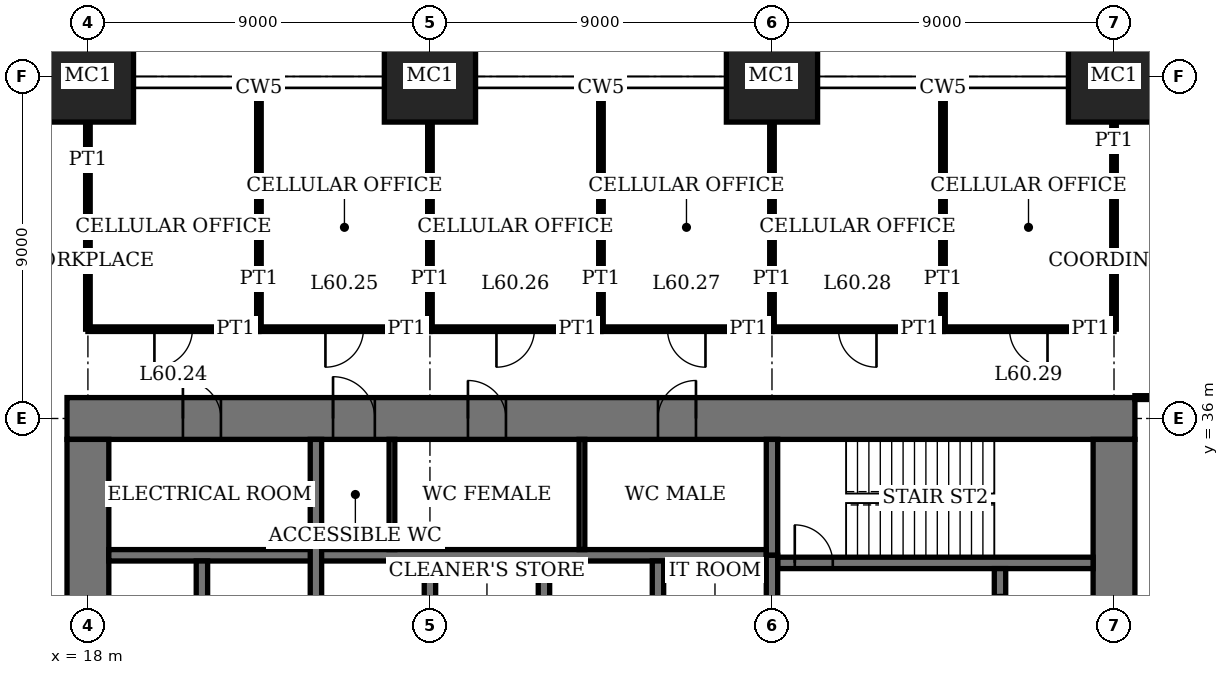
"""IFC4 building model, lengths in metres.
Left out: names, types, materials, properties, quantities, classifications, styles, units other than length and angle.
Written with IfcOpenShell. Run it as: python <this file> out.ifc"""

import sys

from ifc_helpers import new_model, si_unit, direction, frame, frame_2d, origin, origin_2d, place, context, subcontext, project, spatial, rectangle, extrude, element, fill, save


model = new_model("IFC4")
c1 = context("Model", 3, precision=1e-05, world=origin(), true_north=direction((0.0, 1.0)))
c2 = subcontext(c1, "Body", "Model", "MODEL_VIEW")
j1 = project(units=[si_unit("LENGTHUNIT", "METRE"), si_unit("PLANEANGLEUNIT", "RADIAN")], contexts=[c1])
p1 = place(None, origin())
s1 = spatial("IfcSite", under=j1, at=p1, CompositionType="ELEMENT")
p2 = place(p1, origin())
s2 = spatial("IfcBuilding", under=s1, at=p2, CompositionType="ELEMENT")
p3 = place(p2, frame((0.0, 0.0, 247.4)))
s3 = spatial("IfcBuildingStorey", under=s2, at=p3, CompositionType="ELEMENT", Elevation=247.4)
for number, where, z_axis, x_axis in (
    (1, (18.0, 45.0, 0.0), (0.0, 0.0, 1.0), (1.0, 0.0, 0.0)),
    (2, (27.0, 45.0, 0.0), (0.0, 0.0, 1.0), (1.0, 0.0, 0.0)),
    (3, (36.0, 45.0, 0.0), (0.0, 0.0, 1.0), (1.0, 0.0, 0.0)),
    (4, (45.0, 45.0, 0.0), (0.0, 0.0, 1.0), (1.0, 0.0, 0.0)),
):
    element("IfcColumn", number, at=place(p3, frame(where, z_axis=z_axis, x_axis=x_axis)), inside=s3, PredefinedType="COLUMN", context=c2, shape_type="SweptSolid", body=[
        extrude(rectangle(XDim=2.4, YDim=2.4, at=origin_2d()), origin(), (0.0, 0.0, 1.0), 4.0),
    ])
p4 = place(p3, frame((45.55, 36.0, 0.0), z_axis=(0.0, 0.0, 1.0), x_axis=(-1.0, 0.0, 0.0)))
e5 = element("IfcWall", 5, at=p4, inside=s3, PredefinedType="SHEAR", context=c2, shape_type="SweptSolid", body=[
    extrude(rectangle(XDim=28.1, YDim=1.1, at=frame_2d((14.05, 0.0))), origin(), (0.0, 0.0, 1.0), 4.0),
])
p5 = place(p4, frame((11.55, 0.0, 0.0)))
e6 = element("IfcOpeningElement", 6, at=p5, cuts=e5, PredefinedType="OPENING", context=c2, shape_type="SweptSolid", body=[
    extrude(rectangle(XDim=1.0, YDim=2.4, at=frame_2d((0.5, 1.2))), frame((0.0, 0.56, 0.0), z_axis=(0.0, -1.0, 0.0), x_axis=(1.0, 0.0, 0.0)), (0.0, 0.0, 1.0), 1.12),
])
p6 = place(p4, frame((16.55, 0.0, 0.0)))
e7 = element("IfcOpeningElement", 7, at=p6, cuts=e5, PredefinedType="OPENING", context=c2, shape_type="SweptSolid", body=[
    extrude(rectangle(XDim=1.0, YDim=2.4, at=frame_2d((0.5, 1.2))), frame((0.0, 0.56, 0.0), z_axis=(0.0, -1.0, 0.0), x_axis=(1.0, 0.0, 0.0)), (0.0, 0.0, 1.0), 1.12),
])
p7 = place(p4, frame((20.0, 0.0, 0.0)))
e8 = element("IfcOpeningElement", 8, at=p7, cuts=e5, PredefinedType="OPENING", context=c2, shape_type="SweptSolid", body=[
    extrude(rectangle(XDim=1.1, YDim=2.4, at=frame_2d((0.55, 1.2))), frame((0.0, 0.56, 0.0), z_axis=(0.0, -1.0, 0.0), x_axis=(1.0, 0.0, 0.0)), (0.0, 0.0, 1.0), 1.12),
])
p8 = place(p4, frame((24.05, 0.0, 0.0)))
e9 = element("IfcOpeningElement", 9, at=p8, cuts=e5, PredefinedType="OPENING", context=c2, shape_type="SweptSolid", body=[
    extrude(rectangle(XDim=1.0, YDim=2.4, at=frame_2d((0.5, 1.2))), frame((0.0, 0.56, 0.0), z_axis=(0.0, -1.0, 0.0), x_axis=(1.0, 0.0, 0.0)), (0.0, 0.0, 1.0), 1.12),
])
p9 = place(p3, frame((18.0, 35.45, 0.0), z_axis=(0.0, 0.0, 1.0), x_axis=(0.0, -1.0, 0.0)))
e10 = element("IfcWall", 10, at=p9, inside=s3, PredefinedType="SHEAR", context=c2, shape_type="SweptSolid", body=[
    extrude(rectangle(XDim=16.9, YDim=1.1, at=frame_2d((8.45, 0.0))), origin(), (0.0, 0.0, 1.0), 4.0),
])
p10 = place(p9, frame((8.45, 0.0, 0.0)))
e11 = element("IfcOpeningElement", 11, at=p10, cuts=e10, PredefinedType="OPENING", context=c2, shape_type="SweptSolid", body=[
    extrude(rectangle(XDim=1.8, YDim=2.4, at=frame_2d((0.9, 1.2))), frame((0.0, 0.56, 0.0), z_axis=(0.0, -1.0, 0.0), x_axis=(1.0, 0.0, 0.0)), (0.0, 0.0, 1.0), 1.12),
])
p11 = place(p3, frame((45.0, 18.55, 0.0), z_axis=(0.0, 0.0, 1.0), x_axis=(0.0, 1.0, 0.0)))
e12 = element("IfcWall", 12, at=p11, inside=s3, PredefinedType="SHEAR", context=c2, shape_type="SweptSolid", body=[
    extrude(rectangle(XDim=16.9, YDim=1.1, at=frame_2d((8.45, 0.0))), origin(), (0.0, 0.0, 1.0), 4.0),
])
p12 = place(p11, frame((8.45, 0.0, 0.0)))
e13 = element("IfcOpeningElement", 13, at=p12, cuts=e12, PredefinedType="OPENING", context=c2, shape_type="SweptSolid", body=[
    extrude(rectangle(XDim=1.8, YDim=2.4, at=frame_2d((0.9, 1.2))), frame((0.0, 0.56, 0.0), z_axis=(0.0, -1.0, 0.0), x_axis=(1.0, 0.0, 0.0)), (0.0, 0.0, 1.0), 1.12),
])
p13 = place(p3, frame((36.15, 32.2, 0.0), z_axis=(0.0, 0.0, 1.0), x_axis=(1.0, 0.0, 0.0)))
e14 = element("IfcWall", 14, at=p13, inside=s3, PredefinedType="SHEAR", context=c2, shape_type="SweptSolid", body=[
    extrude(rectangle(XDim=8.3, YDim=0.3, at=frame_2d((4.15, 0.0))), origin(), (0.0, 0.0, 1.0), 4.0),
])
p14 = place(p13, frame((0.45, 0.0, 0.0)))
e15 = element("IfcOpeningElement", 15, at=p14, cuts=e14, PredefinedType="OPENING", context=c2, shape_type="SweptSolid", body=[
    extrude(rectangle(XDim=1.0, YDim=2.4, at=frame_2d((0.5, 1.2))), frame((0.0, 0.16, 0.0), z_axis=(0.0, -1.0, 0.0), x_axis=(1.0, 0.0, 0.0)), (0.0, 0.0, 1.0), 0.32),
])
p15 = place(p3, frame((36.0, 32.4, 0.0), z_axis=(0.0, 0.0, 1.0), x_axis=(0.0, 1.0, 0.0)))
e16 = element("IfcWall", 16, at=p15, inside=s3, PredefinedType="SHEAR", context=c2, shape_type="SweptSolid", body=[
    extrude(rectangle(XDim=3.05, YDim=0.3, at=frame_2d((1.525, 0.0))), origin(), (0.0, 0.0, 1.0), 4.0),
])
p16 = place(p3, frame((42.0, 29.55, 0.0), z_axis=(0.0, 0.0, 1.0), x_axis=(0.0, 1.0, 0.0)))
e17 = element("IfcWall", 17, at=p16, inside=s3, PredefinedType="SHEAR", context=c2, shape_type="SweptSolid", body=[
    extrude(rectangle(XDim=2.5, YDim=0.3, at=frame_2d((1.25, 0.0))), origin(), (0.0, 0.0, 1.0), 4.0),
])
p17 = place(p16, frame((0.7, 0.0, 0.0)))
e18 = element("IfcOpeningElement", 18, at=p17, cuts=e17, PredefinedType="OPENING", context=c2, shape_type="SweptSolid", body=[
    extrude(rectangle(XDim=1.1, YDim=2.4, at=frame_2d((0.55, 1.2))), frame((0.0, 0.16, 0.0), z_axis=(0.0, -1.0, 0.0), x_axis=(1.0, 0.0, 0.0)), (0.0, 0.0, 1.0), 0.32),
])
p18 = place(p3, frame((18.55, 32.4, 0.0), z_axis=(0.0, 0.0, 1.0), x_axis=(1.0, 0.0, 0.0)))
e19 = element("IfcWall", 19, at=p18, inside=s3, PredefinedType="SHEAR", context=c2, shape_type="SweptSolid", body=[
    extrude(rectangle(XDim=17.3, YDim=0.3, at=frame_2d((8.65, 0.0))), origin(), (0.0, 0.0, 1.0), 4.0),
])
for number, where, z_axis, x_axis in (
    (20, (33.0, 29.55, 0.0), (0.0, 0.0, 1.0), (0.0, 1.0, 0.0)),
    (21, (30.0, 29.55, 0.0), (0.0, 0.0, 1.0), (0.0, 1.0, 0.0)),
    (22, (27.0, 29.55, 0.0), (0.0, 0.0, 1.0), (0.0, 1.0, 0.0)),
):
    element("IfcWall", number, at=place(p3, frame(where, z_axis=z_axis, x_axis=x_axis)), inside=s3, PredefinedType="SHEAR", context=c2, shape_type="SweptSolid", body=[
        extrude(rectangle(XDim=2.7, YDim=0.3, at=frame_2d((1.35, 0.0))), origin(), (0.0, 0.0, 1.0), 4.0),
    ])
p19 = place(p3, frame((24.0, 29.55, 0.0), z_axis=(0.0, 0.0, 1.0), x_axis=(0.0, 1.0, 0.0)))
e23 = element("IfcWall", 23, at=p19, inside=s3, PredefinedType="SHEAR", context=c2, shape_type="SweptSolid", body=[
    extrude(rectangle(XDim=5.9, YDim=0.3, at=frame_2d((2.95, 0.0))), origin(), (0.0, 0.0, 1.0), 4.0),
])
p20 = place(p3, frame((21.0, 29.55, 0.0), z_axis=(0.0, 0.0, 1.0), x_axis=(0.0, 1.0, 0.0)))
e24 = element("IfcWall", 24, at=p20, inside=s3, PredefinedType="SHEAR", context=c2, shape_type="SweptSolid", body=[
    extrude(rectangle(XDim=2.7, YDim=0.3, at=frame_2d((1.35, 0.0))), origin(), (0.0, 0.0, 1.0), 4.0),
])
p21 = place(p3, frame((36.0, 29.55, 0.0), z_axis=(0.0, 0.0, 1.0), x_axis=(0.0, 1.0, 0.0)))
e25 = element("IfcWall", 25, at=p21, inside=s3, PredefinedType="SHEAR", context=c2, shape_type="SweptSolid", body=[
    extrude(rectangle(XDim=2.85, YDim=0.3, at=frame_2d((1.425, 0.0))), origin(), (0.0, 0.0, 1.0), 4.0),
])
p22 = place(p3, frame((45.55, 36.55, 0.0), z_axis=(0.0, 0.0, 1.0), x_axis=(1.0, 0.0, 0.0)))
e26 = element("IfcWall", 26, at=p22, inside=s3, PredefinedType="PARTITIONING", context=c2, shape_type="SweptSolid", body=[
    extrude(rectangle(XDim=7.25, YDim=0.1, at=frame_2d((3.625, 0.0))), origin(), (0.0, 0.0, 1.0), 3.75),
])
p23 = place(p3, frame((18.0, 38.35, 0.0), z_axis=(0.0, 0.0, 1.0), x_axis=(1.0, 0.0, 0.0)))
e27 = element("IfcWall", 27, at=p23, inside=s3, PredefinedType="PARTITIONING", context=c2, shape_type="SweptSolid", body=[
    extrude(rectangle(XDim=4.5, YDim=0.12, at=frame_2d((2.25, 0.0))), origin(), (0.0, 0.0, 1.0), 3.75),
])
p24 = place(p23, frame((1.75, 0.0, 0.0)))
e28 = element("IfcOpeningElement", 28, at=p24, cuts=e27, PredefinedType="OPENING", context=c2, shape_type="SweptSolid", body=[
    extrude(rectangle(XDim=1.0, YDim=2.4, at=frame_2d((0.5, 1.2))), frame((0.0, 0.07, 0.0), z_axis=(0.0, -1.0, 0.0), x_axis=(1.0, 0.0, 0.0)), (0.0, 0.0, 1.0), 0.14),
])
p25 = place(p3, frame((22.5, 38.35, 0.0), z_axis=(0.0, 0.0, 1.0), x_axis=(1.0, 0.0, 0.0)))
e29 = element("IfcWall", 29, at=p25, inside=s3, PredefinedType="PARTITIONING", context=c2, shape_type="SweptSolid", body=[
    extrude(rectangle(XDim=4.5, YDim=0.12, at=frame_2d((2.25, 0.0))), origin(), (0.0, 0.0, 1.0), 3.75),
])
p26 = place(p25, frame((1.75, 0.0, 0.0)))
e30 = element("IfcOpeningElement", 30, at=p26, cuts=e29, PredefinedType="OPENING", context=c2, shape_type="SweptSolid", body=[
    extrude(rectangle(XDim=1.0, YDim=2.4, at=frame_2d((0.5, 1.2))), frame((0.0, 0.07, 0.0), z_axis=(0.0, -1.0, 0.0), x_axis=(1.0, 0.0, 0.0)), (0.0, 0.0, 1.0), 0.14),
])
p27 = place(p3, frame((27.0, 38.35, 0.0), z_axis=(0.0, 0.0, 1.0), x_axis=(1.0, 0.0, 0.0)))
e31 = element("IfcWall", 31, at=p27, inside=s3, PredefinedType="PARTITIONING", context=c2, shape_type="SweptSolid", body=[
    extrude(rectangle(XDim=4.5, YDim=0.12, at=frame_2d((2.25, 0.0))), origin(), (0.0, 0.0, 1.0), 3.75),
])
p28 = place(p27, frame((1.75, 0.0, 0.0)))
e32 = element("IfcOpeningElement", 32, at=p28, cuts=e31, PredefinedType="OPENING", context=c2, shape_type="SweptSolid", body=[
    extrude(rectangle(XDim=1.0, YDim=2.4, at=frame_2d((0.5, 1.2))), frame((0.0, 0.07, 0.0), z_axis=(0.0, -1.0, 0.0), x_axis=(1.0, 0.0, 0.0)), (0.0, 0.0, 1.0), 0.14),
])
p29 = place(p3, frame((31.5, 38.35, 0.0), z_axis=(0.0, 0.0, 1.0), x_axis=(1.0, 0.0, 0.0)))
e33 = element("IfcWall", 33, at=p29, inside=s3, PredefinedType="PARTITIONING", context=c2, shape_type="SweptSolid", body=[
    extrude(rectangle(XDim=4.5, YDim=0.12, at=frame_2d((2.25, 0.0))), origin(), (0.0, 0.0, 1.0), 3.75),
])
p30 = place(p29, frame((1.75, 0.0, 0.0)))
e34 = element("IfcOpeningElement", 34, at=p30, cuts=e33, PredefinedType="OPENING", context=c2, shape_type="SweptSolid", body=[
    extrude(rectangle(XDim=1.0, YDim=2.4, at=frame_2d((0.5, 1.2))), frame((0.0, 0.07, 0.0), z_axis=(0.0, -1.0, 0.0), x_axis=(1.0, 0.0, 0.0)), (0.0, 0.0, 1.0), 0.14),
])
p31 = place(p3, frame((36.0, 38.35, 0.0), z_axis=(0.0, 0.0, 1.0), x_axis=(1.0, 0.0, 0.0)))
e35 = element("IfcWall", 35, at=p31, inside=s3, PredefinedType="PARTITIONING", context=c2, shape_type="SweptSolid", body=[
    extrude(rectangle(XDim=4.5, YDim=0.12, at=frame_2d((2.25, 0.0))), origin(), (0.0, 0.0, 1.0), 3.75),
])
p32 = place(p31, frame((1.75, 0.0, 0.0)))
e36 = element("IfcOpeningElement", 36, at=p32, cuts=e35, PredefinedType="OPENING", context=c2, shape_type="SweptSolid", body=[
    extrude(rectangle(XDim=1.0, YDim=2.4, at=frame_2d((0.5, 1.2))), frame((0.0, 0.07, 0.0), z_axis=(0.0, -1.0, 0.0), x_axis=(1.0, 0.0, 0.0)), (0.0, 0.0, 1.0), 0.14),
])
p33 = place(p3, frame((40.5, 38.35, 0.0), z_axis=(0.0, 0.0, 1.0), x_axis=(1.0, 0.0, 0.0)))
e37 = element("IfcWall", 37, at=p33, inside=s3, PredefinedType="PARTITIONING", context=c2, shape_type="SweptSolid", body=[
    extrude(rectangle(XDim=4.5, YDim=0.12, at=frame_2d((2.25, 0.0))), origin(), (0.0, 0.0, 1.0), 3.75),
])
p34 = place(p33, frame((1.75, 0.0, 0.0)))
e38 = element("IfcOpeningElement", 38, at=p34, cuts=e37, PredefinedType="OPENING", context=c2, shape_type="SweptSolid", body=[
    extrude(rectangle(XDim=1.0, YDim=2.4, at=frame_2d((0.5, 1.2))), frame((0.0, 0.07, 0.0), z_axis=(0.0, -1.0, 0.0), x_axis=(1.0, 0.0, 0.0)), (0.0, 0.0, 1.0), 0.14),
])
p35 = place(p3, frame((18.0, 38.35, 0.0), z_axis=(0.0, 0.0, 1.0), x_axis=(0.0, 1.0, 0.0)))
e39 = element("IfcWall", 39, at=p35, inside=s3, PredefinedType="PARTITIONING", context=c2, shape_type="SweptSolid", body=[
    extrude(rectangle(XDim=5.45, YDim=0.12, at=frame_2d((2.725, 0.0))), origin(), (0.0, 0.0, 1.0), 3.05),
])
p36 = place(p3, frame((22.5, 38.35, 0.0), z_axis=(0.0, 0.0, 1.0), x_axis=(0.0, 1.0, 0.0)))
e40 = element("IfcWall", 40, at=p36, inside=s3, PredefinedType="PARTITIONING", context=c2, shape_type="SweptSolid", body=[
    extrude(rectangle(XDim=6.34, YDim=0.12, at=frame_2d((3.17, 0.0))), origin(), (0.0, 0.0, 1.0), 3.75),
])
p37 = place(p3, frame((27.0, 38.35, 0.0), z_axis=(0.0, 0.0, 1.0), x_axis=(0.0, 1.0, 0.0)))
e41 = element("IfcWall", 41, at=p37, inside=s3, PredefinedType="PARTITIONING", context=c2, shape_type="SweptSolid", body=[
    extrude(rectangle(XDim=5.45, YDim=0.12, at=frame_2d((2.725, 0.0))), origin(), (0.0, 0.0, 1.0), 3.05),
])
p38 = place(p3, frame((31.5, 38.35, 0.0), z_axis=(0.0, 0.0, 1.0), x_axis=(0.0, 1.0, 0.0)))
e42 = element("IfcWall", 42, at=p38, inside=s3, PredefinedType="PARTITIONING", context=c2, shape_type="SweptSolid", body=[
    extrude(rectangle(XDim=6.34, YDim=0.12, at=frame_2d((3.17, 0.0))), origin(), (0.0, 0.0, 1.0), 3.75),
])
p39 = place(p3, frame((36.0, 38.35, 0.0), z_axis=(0.0, 0.0, 1.0), x_axis=(0.0, 1.0, 0.0)))
e43 = element("IfcWall", 43, at=p39, inside=s3, PredefinedType="PARTITIONING", context=c2, shape_type="SweptSolid", body=[
    extrude(rectangle(XDim=5.45, YDim=0.12, at=frame_2d((2.725, 0.0))), origin(), (0.0, 0.0, 1.0), 3.05),
])
p40 = place(p3, frame((40.5, 38.35, 0.0), z_axis=(0.0, 0.0, 1.0), x_axis=(0.0, 1.0, 0.0)))
e44 = element("IfcWall", 44, at=p40, inside=s3, PredefinedType="PARTITIONING", context=c2, shape_type="SweptSolid", body=[
    extrude(rectangle(XDim=6.34, YDim=0.12, at=frame_2d((3.17, 0.0))), origin(), (0.0, 0.0, 1.0), 3.75),
])
p41 = place(p3, frame((45.0, 38.35, 0.0), z_axis=(0.0, 0.0, 1.0), x_axis=(0.0, 1.0, 0.0)))
e45 = element("IfcWall", 45, at=p41, inside=s3, PredefinedType="PARTITIONING", context=c2, shape_type="SweptSolid", body=[
    extrude(rectangle(XDim=5.45, YDim=0.12, at=frame_2d((2.725, 0.0))), origin(), (0.0, 0.0, 1.0), 3.05),
])
for number, where, z_axis, x_axis in (
    (46, (31.0, 32.55, 0.0), (0.0, 0.0, 1.0), (0.0, 1.0, 0.0)),
    (47, (26.0, 32.55, 0.0), (0.0, 0.0, 1.0), (0.0, 1.0, 0.0)),
):
    element("IfcWall", number, at=place(p3, frame(where, z_axis=z_axis, x_axis=x_axis)), inside=s3, PredefinedType="PARTITIONING", context=c2, shape_type="SweptSolid", body=[
        extrude(rectangle(XDim=2.9, YDim=0.15, at=frame_2d((1.45, 0.0))), origin(), (0.0, 0.0, 1.0), 3.75),
    ])
p42 = place(p5, origin())
e48 = element("IfcDoor", 48, at=p42, inside=s3, OperationType="SINGLE_SWING_LEFT", PredefinedType="DOOR", context=c2, shape_type="SweptSolid", body=[
    extrude(rectangle(XDim=1.0, YDim=2.4, at=frame_2d((0.5, 1.2))), frame((0.0, 0.025, 0.0), z_axis=(0.0, -1.0, 0.0), x_axis=(1.0, 0.0, 0.0)), (0.0, 0.0, 1.0), 0.05),
    extrude(rectangle(XDim=0.04, YDim=2.4, at=frame_2d((0.02, 1.2))), frame((0.0, 0.4, 0.0), z_axis=(0.0, -1.0, 0.0), x_axis=(1.0, 0.0, 0.0)), (0.0, 0.0, 1.0), 0.8),
    extrude(rectangle(XDim=0.04, YDim=2.4, at=frame_2d((0.98, 1.2))), frame((0.0, 0.4, 0.0), z_axis=(0.0, -1.0, 0.0), x_axis=(1.0, 0.0, 0.0)), (0.0, 0.0, 1.0), 0.8),
    extrude(rectangle(XDim=1.0, YDim=0.04, at=frame_2d((0.5, 2.38))), frame((0.0, 0.4, 0.0), z_axis=(0.0, -1.0, 0.0), x_axis=(1.0, 0.0, 0.0)), (0.0, 0.0, 1.0), 0.8),
])
fill(e6, e48)
p43 = place(p6, origin())
e49 = element("IfcDoor", 49, at=p43, inside=s3, OperationType="SINGLE_SWING_RIGHT", PredefinedType="DOOR", context=c2, shape_type="SweptSolid", body=[
    extrude(rectangle(XDim=1.0, YDim=2.4, at=frame_2d((0.5, 1.2))), frame((0.0, 0.025, 0.0), z_axis=(0.0, -1.0, 0.0), x_axis=(1.0, 0.0, 0.0)), (0.0, 0.0, 1.0), 0.05),
    extrude(rectangle(XDim=0.04, YDim=2.4, at=frame_2d((0.02, 1.2))), frame((0.0, 0.4, 0.0), z_axis=(0.0, -1.0, 0.0), x_axis=(1.0, 0.0, 0.0)), (0.0, 0.0, 1.0), 0.8),
    extrude(rectangle(XDim=0.04, YDim=2.4, at=frame_2d((0.98, 1.2))), frame((0.0, 0.4, 0.0), z_axis=(0.0, -1.0, 0.0), x_axis=(1.0, 0.0, 0.0)), (0.0, 0.0, 1.0), 0.8),
    extrude(rectangle(XDim=1.0, YDim=0.04, at=frame_2d((0.5, 2.38))), frame((0.0, 0.4, 0.0), z_axis=(0.0, -1.0, 0.0), x_axis=(1.0, 0.0, 0.0)), (0.0, 0.0, 1.0), 0.8),
])
fill(e7, e49)
p44 = place(p7, origin())
e50 = element("IfcDoor", 50, at=p44, inside=s3, OperationType="SINGLE_SWING_RIGHT", PredefinedType="DOOR", context=c2, shape_type="SweptSolid", body=[
    extrude(rectangle(XDim=1.1, YDim=2.4, at=frame_2d((0.55, 1.2))), frame((0.0, 0.025, 0.0), z_axis=(0.0, -1.0, 0.0), x_axis=(1.0, 0.0, 0.0)), (0.0, 0.0, 1.0), 0.05),
    extrude(rectangle(XDim=0.04, YDim=2.4, at=frame_2d((0.02, 1.2))), frame((0.0, 0.44, 0.0), z_axis=(0.0, -1.0, 0.0), x_axis=(1.0, 0.0, 0.0)), (0.0, 0.0, 1.0), 0.88),
    extrude(rectangle(XDim=0.04, YDim=2.4, at=frame_2d((1.08, 1.2))), frame((0.0, 0.44, 0.0), z_axis=(0.0, -1.0, 0.0), x_axis=(1.0, 0.0, 0.0)), (0.0, 0.0, 1.0), 0.88),
    extrude(rectangle(XDim=1.1, YDim=0.04, at=frame_2d((0.55, 2.38))), frame((0.0, 0.44, 0.0), z_axis=(0.0, -1.0, 0.0), x_axis=(1.0, 0.0, 0.0)), (0.0, 0.0, 1.0), 0.88),
])
fill(e8, e50)
p45 = place(p8, origin())
e51 = element("IfcDoor", 51, at=p45, inside=s3, OperationType="SINGLE_SWING_RIGHT", PredefinedType="DOOR", context=c2, shape_type="SweptSolid", body=[
    extrude(rectangle(XDim=1.0, YDim=2.4, at=frame_2d((0.5, 1.2))), frame((0.0, 0.025, 0.0), z_axis=(0.0, -1.0, 0.0), x_axis=(1.0, 0.0, 0.0)), (0.0, 0.0, 1.0), 0.05),
    extrude(rectangle(XDim=0.04, YDim=2.4, at=frame_2d((0.02, 1.2))), frame((0.0, 0.4, 0.0), z_axis=(0.0, -1.0, 0.0), x_axis=(1.0, 0.0, 0.0)), (0.0, 0.0, 1.0), 0.8),
    extrude(rectangle(XDim=0.04, YDim=2.4, at=frame_2d((0.98, 1.2))), frame((0.0, 0.4, 0.0), z_axis=(0.0, -1.0, 0.0), x_axis=(1.0, 0.0, 0.0)), (0.0, 0.0, 1.0), 0.8),
    extrude(rectangle(XDim=1.0, YDim=0.04, at=frame_2d((0.5, 2.38))), frame((0.0, 0.4, 0.0), z_axis=(0.0, -1.0, 0.0), x_axis=(1.0, 0.0, 0.0)), (0.0, 0.0, 1.0), 0.8),
])
fill(e9, e51)
p46 = place(p14, origin())
e52 = element("IfcDoor", 52, at=p46, inside=s3, OperationType="SINGLE_SWING_RIGHT", PredefinedType="DOOR", context=c2, shape_type="SweptSolid", body=[
    extrude(rectangle(XDim=1.0, YDim=2.4, at=frame_2d((0.5, 1.2))), frame((0.0, 0.03, 0.0), z_axis=(0.0, -1.0, 0.0), x_axis=(1.0, 0.0, 0.0)), (0.0, 0.0, 1.0), 0.06),
])
fill(e15, e52)
p47 = place(p24, origin())
e53 = element("IfcDoor", 53, at=p47, inside=s3, OperationType="SINGLE_SWING_LEFT", PredefinedType="DOOR", context=c2, shape_type="SweptSolid", body=[
    extrude(rectangle(XDim=1.0, YDim=2.4, at=frame_2d((0.5, 1.2))), frame((0.0, 0.025, 0.0), z_axis=(0.0, -1.0, 0.0), x_axis=(1.0, 0.0, 0.0)), (0.0, 0.0, 1.0), 0.05),
])
fill(e28, e53)
p48 = place(p26, origin())
e54 = element("IfcDoor", 54, at=p48, inside=s3, OperationType="SINGLE_SWING_LEFT", PredefinedType="DOOR", context=c2, shape_type="SweptSolid", body=[
    extrude(rectangle(XDim=1.0, YDim=2.4, at=frame_2d((0.5, 1.2))), frame((0.0, 0.025, 0.0), z_axis=(0.0, -1.0, 0.0), x_axis=(1.0, 0.0, 0.0)), (0.0, 0.0, 1.0), 0.05),
])
fill(e30, e54)
p49 = place(p28, origin())
e55 = element("IfcDoor", 55, at=p49, inside=s3, OperationType="SINGLE_SWING_LEFT", PredefinedType="DOOR", context=c2, shape_type="SweptSolid", body=[
    extrude(rectangle(XDim=1.0, YDim=2.4, at=frame_2d((0.5, 1.2))), frame((0.0, 0.025, 0.0), z_axis=(0.0, -1.0, 0.0), x_axis=(1.0, 0.0, 0.0)), (0.0, 0.0, 1.0), 0.05),
])
fill(e32, e55)
p50 = place(p30, origin())
e56 = element("IfcDoor", 56, at=p50, inside=s3, OperationType="SINGLE_SWING_RIGHT", PredefinedType="DOOR", context=c2, shape_type="SweptSolid", body=[
    extrude(rectangle(XDim=1.0, YDim=2.4, at=frame_2d((0.5, 1.2))), frame((0.0, 0.025, 0.0), z_axis=(0.0, -1.0, 0.0), x_axis=(1.0, 0.0, 0.0)), (0.0, 0.0, 1.0), 0.05),
])
fill(e34, e56)
p51 = place(p32, origin())
e57 = element("IfcDoor", 57, at=p51, inside=s3, OperationType="SINGLE_SWING_RIGHT", PredefinedType="DOOR", context=c2, shape_type="SweptSolid", body=[
    extrude(rectangle(XDim=1.0, YDim=2.4, at=frame_2d((0.5, 1.2))), frame((0.0, 0.025, 0.0), z_axis=(0.0, -1.0, 0.0), x_axis=(1.0, 0.0, 0.0)), (0.0, 0.0, 1.0), 0.05),
])
fill(e36, e57)
p52 = place(p34, origin())
e58 = element("IfcDoor", 58, at=p52, inside=s3, OperationType="SINGLE_SWING_RIGHT", PredefinedType="DOOR", context=c2, shape_type="SweptSolid", body=[
    extrude(rectangle(XDim=1.0, YDim=2.4, at=frame_2d((0.5, 1.2))), frame((0.0, 0.025, 0.0), z_axis=(0.0, -1.0, 0.0), x_axis=(1.0, 0.0, 0.0)), (0.0, 0.0, 1.0), 0.05),
])
fill(e38, e58)
save(model, sys.argv[1])
